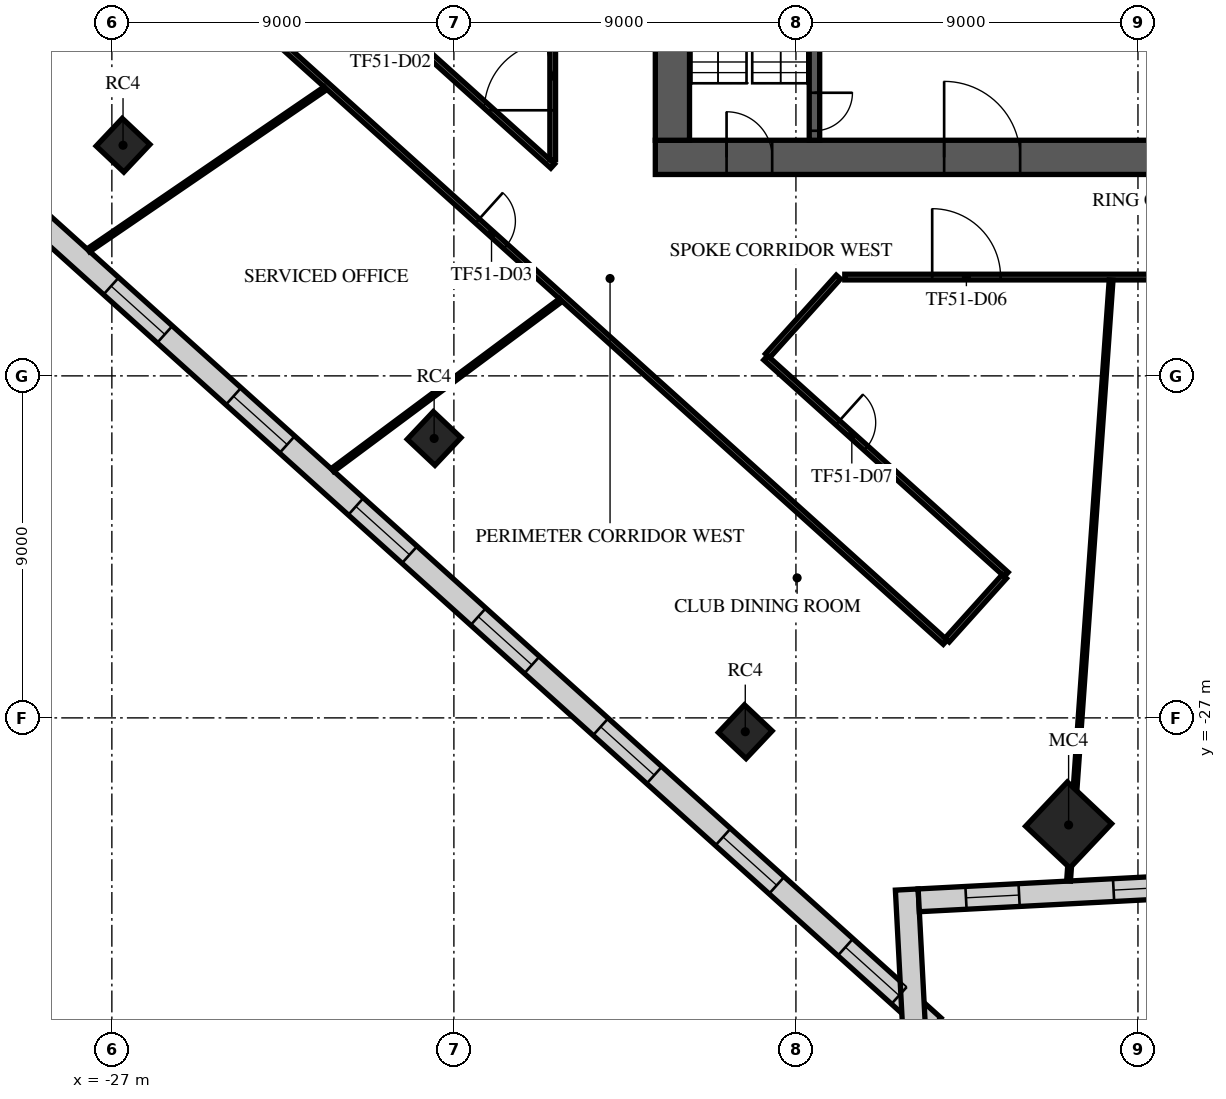
"""IFC4 building model, lengths in metres.
Left out: names, types, materials, properties, quantities, classifications, styles, units other than length and angle.
Written with IfcOpenShell. Run it as: python <this file> out.ifc"""

import sys

from ifc_helpers import new_model, si_unit, direction, frame, frame_2d, origin, origin_2d, place, context, subcontext, project, spatial, rectangle, extrude, element, fill, save


model = new_model("IFC4")
c1 = context("Model", 3, precision=1e-05, world=origin(), true_north=direction((0.0, 1.0)))
c2 = subcontext(c1, "Body", "Model", "MODEL_VIEW")
j1 = project(units=[si_unit("LENGTHUNIT", "METRE"), si_unit("PLANEANGLEUNIT", "RADIAN")], contexts=[c1])
p1 = place(None, origin())
s1 = spatial("IfcSite", under=j1, at=p1, CompositionType="ELEMENT")
p2 = place(p1, origin())
s2 = spatial("IfcBuilding", under=s1, at=p2, CompositionType="ELEMENT")
p3 = place(p2, frame((0.0, 0.0, 217.3)))
s3 = spatial("IfcBuildingStorey", under=s2, at=p3, CompositionType="ELEMENT", Elevation=217.3)
for number, where, z_axis, x_axis in (
    (1, (-26.706, -11.931, 0.0), (0.0, 0.0, 1.0), (0.686, 0.728, 0.0)),
    (2, (-18.52, -19.647, 0.0), (0.0, 0.0, 1.0), (0.686, 0.728, 0.0)),
    (3, (-10.333, -27.364, 0.0), (0.0, 0.0, 1.0), (0.686, 0.728, 0.0)),
):
    element("IfcColumn", number, at=place(p3, frame(where, z_axis=z_axis, x_axis=x_axis)), inside=s3, PredefinedType="COLUMN", context=c2, shape_type="SweptSolid", body=[
        extrude(rectangle(XDim=1.0, YDim=1.0, at=origin_2d()), origin(), (0.0, 0.0, 1.0), 4.0),
    ])
p4 = place(p3, frame((-1.825, -29.818, 0.0), z_axis=(0.0, 0.0, 1.0), x_axis=(0.685916152371, 0.727680583715, 0.0)))
e4 = element("IfcColumn", 4, at=p4, inside=s3, PredefinedType="COLUMN", context=c2, shape_type="SweptSolid", body=[
    extrude(rectangle(XDim=1.6, YDim=1.6, at=origin_2d()), origin(), (0.0, 0.0, 1.0), 4.0),
])
p5 = place(p3, frame((-12.7, -12.25, 0.0), z_axis=(0.0, 0.0, 1.0), x_axis=(1.0, 0.0, 0.0)))
e5 = element("IfcWall", 5, at=p5, inside=s3, PredefinedType="SHEAR", context=c2, shape_type="SweptSolid", body=[
    extrude(rectangle(XDim=25.4, YDim=0.9, at=frame_2d((12.7, 0.0))), origin(), (0.0, 0.0, 1.0), 3.62),
])
p6 = place(p5, frame((7.6, 0.0, 0.0)))
e6 = element("IfcOpeningElement", 6, at=p6, cuts=e5, PredefinedType="OPENING", context=c2, shape_type="SweptSolid", body=[
    extrude(rectangle(XDim=2.0, YDim=2.1, at=frame_2d((1.0, 1.05))), frame((0.0, 0.46, 0.0), z_axis=(0.0, -1.0, 0.0), x_axis=(1.0, 0.0, 0.0)), (0.0, 0.0, 1.0), 0.92),
])
p7 = place(p5, frame((17.725, 0.0, 0.0)))
e7 = element("IfcOpeningElement", 7, at=p7, cuts=e5, PredefinedType="OPENING", context=c2, shape_type="SweptSolid", body=[
    extrude(rectangle(XDim=1.2, YDim=2.1, at=frame_2d((0.6, 1.05))), frame((0.0, 0.46, 0.0), z_axis=(0.0, -1.0, 0.0), x_axis=(1.0, 0.0, 0.0)), (0.0, 0.0, 1.0), 0.92),
])
p8 = place(p5, frame((1.875, 0.0, 0.0)))
e8 = element("IfcOpeningElement", 8, at=p8, cuts=e5, PredefinedType="OPENING", context=c2, shape_type="SweptSolid", body=[
    extrude(rectangle(XDim=1.2, YDim=2.1, at=frame_2d((0.6, 1.05))), frame((0.0, 0.46, 0.0), z_axis=(0.0, -1.0, 0.0), x_axis=(1.0, 0.0, 0.0)), (0.0, 0.0, 1.0), 0.92),
])
p9 = place(p5, frame((22.325, 0.0, 0.0)))
e9 = element("IfcOpeningElement", 9, at=p9, cuts=e5, PredefinedType="OPENING", context=c2, shape_type="SweptSolid", body=[
    extrude(rectangle(XDim=1.2, YDim=2.1, at=frame_2d((0.6, 1.05))), frame((0.0, 0.46, 0.0), z_axis=(0.0, -1.0, 0.0), x_axis=(1.0, 0.0, 0.0)), (0.0, 0.0, 1.0), 0.92),
])
p10 = place(p3, frame((-12.25, -11.8, 0.0), z_axis=(0.0, 0.0, 1.0), x_axis=(0.0, 1.0, 0.0)))
e10 = element("IfcWall", 10, at=p10, inside=s3, PredefinedType="SHEAR", context=c2, shape_type="SweptSolid", body=[
    extrude(rectangle(XDim=23.6, YDim=0.9, at=frame_2d((11.8, 0.0))), origin(), (0.0, 0.0, 1.0), 3.62),
])
p11 = place(p10, frame((10.6, 0.0, 0.0)))
e11 = element("IfcOpeningElement", 11, at=p11, cuts=e10, PredefinedType="OPENING", context=c2, shape_type="SweptSolid", body=[
    extrude(rectangle(XDim=2.4, YDim=2.4, at=frame_2d((1.2, 1.2))), frame((0.0, 0.46, 0.0), z_axis=(0.0, -1.0, 0.0), x_axis=(1.0, 0.0, 0.0)), (0.0, 0.0, 1.0), 0.92),
])
p12 = place(p3, frame((-8.512, -4.55, 0.0), z_axis=(0.0, 0.0, 1.0), x_axis=(0.0, -1.0, 0.0)))
e12 = element("IfcWall", 12, at=p12, inside=s3, PredefinedType="SOLIDWALL", context=c2, shape_type="SweptSolid", body=[
    extrude(rectangle(XDim=7.25, YDim=0.275, at=frame_2d((3.625, 0.0))), origin(), (0.0, 0.0, 1.0), 3.62),
])
p13 = place(p12, frame((6.0, 0.0, 0.0)))
e13 = element("IfcOpeningElement", 13, at=p13, cuts=e12, PredefinedType="OPENING", context=c2, shape_type="SweptSolid", body=[
    extrude(rectangle(XDim=1.0, YDim=2.1, at=frame_2d((0.5, 1.05))), frame((0.0, 0.147, 0.0), z_axis=(0.0, -1.0, 0.0), x_axis=(1.0, 0.0, 0.0)), (0.0, 0.0, 1.0), 0.295),
])
p14 = place(p3, frame((-34.365, -9.023, 0.0), z_axis=(0.0, 0.0, 1.0), x_axis=(0.743146896498, -0.66912830625, 0.0)))
e14 = element("IfcWall", 14, at=p14, inside=s3, PredefinedType="STANDARD", context=c2, shape_type="SweptSolid", body=[
    extrude(rectangle(XDim=39.0, YDim=0.6, at=frame_2d((19.5, 0.0))), origin(), (0.0, 0.0, 1.0), 3.62),
])
p15 = place(p14, frame((1.217, 0.0, 0.9)))
e15 = element("IfcOpeningElement", 15, at=p15, cuts=e14, PredefinedType="OPENING", context=c2, shape_type="SweptSolid", body=[
    extrude(rectangle(XDim=1.9, YDim=2.1, at=frame_2d((0.95, 1.05))), frame((0.0, 0.31, 0.0), z_axis=(0.0, -1.0, 0.0), x_axis=(1.0, 0.0, 0.0)), (0.0, 0.0, 1.0), 0.62),
])
p16 = place(p14, frame((5.55, 0.0, 0.9)))
e16 = element("IfcOpeningElement", 16, at=p16, cuts=e14, PredefinedType="OPENING", context=c2, shape_type="SweptSolid", body=[
    extrude(rectangle(XDim=1.9, YDim=2.1, at=frame_2d((0.95, 1.05))), frame((0.0, 0.31, 0.0), z_axis=(0.0, -1.0, 0.0), x_axis=(1.0, 0.0, 0.0)), (0.0, 0.0, 1.0), 0.62),
])
p17 = place(p14, frame((9.883, 0.0, 0.9)))
e17 = element("IfcOpeningElement", 17, at=p17, cuts=e14, PredefinedType="OPENING", context=c2, shape_type="SweptSolid", body=[
    extrude(rectangle(XDim=1.9, YDim=2.1, at=frame_2d((0.95, 1.05))), frame((0.0, 0.31, 0.0), z_axis=(0.0, -1.0, 0.0), x_axis=(1.0, 0.0, 0.0)), (0.0, 0.0, 1.0), 0.62),
])
p18 = place(p14, frame((14.217, 0.0, 0.9)))
e18 = element("IfcOpeningElement", 18, at=p18, cuts=e14, PredefinedType="OPENING", context=c2, shape_type="SweptSolid", body=[
    extrude(rectangle(XDim=1.9, YDim=2.1, at=frame_2d((0.95, 1.05))), frame((0.0, 0.31, 0.0), z_axis=(0.0, -1.0, 0.0), x_axis=(1.0, 0.0, 0.0)), (0.0, 0.0, 1.0), 0.62),
])
p19 = place(p14, frame((18.55, 0.0, 0.9)))
e19 = element("IfcOpeningElement", 19, at=p19, cuts=e14, PredefinedType="OPENING", context=c2, shape_type="SweptSolid", body=[
    extrude(rectangle(XDim=1.9, YDim=2.1, at=frame_2d((0.95, 1.05))), frame((0.0, 0.31, 0.0), z_axis=(0.0, -1.0, 0.0), x_axis=(1.0, 0.0, 0.0)), (0.0, 0.0, 1.0), 0.62),
])
p20 = place(p14, frame((22.883, 0.0, 0.9)))
e20 = element("IfcOpeningElement", 20, at=p20, cuts=e14, PredefinedType="OPENING", context=c2, shape_type="SweptSolid", body=[
    extrude(rectangle(XDim=1.9, YDim=2.1, at=frame_2d((0.95, 1.05))), frame((0.0, 0.31, 0.0), z_axis=(0.0, -1.0, 0.0), x_axis=(1.0, 0.0, 0.0)), (0.0, 0.0, 1.0), 0.62),
])
p21 = place(p14, frame((27.217, 0.0, 0.9)))
e21 = element("IfcOpeningElement", 21, at=p21, cuts=e14, PredefinedType="OPENING", context=c2, shape_type="SweptSolid", body=[
    extrude(rectangle(XDim=1.9, YDim=2.1, at=frame_2d((0.95, 1.05))), frame((0.0, 0.31, 0.0), z_axis=(0.0, -1.0, 0.0), x_axis=(1.0, 0.0, 0.0)), (0.0, 0.0, 1.0), 0.62),
])
p22 = place(p14, frame((31.55, 0.0, 0.9)))
e22 = element("IfcOpeningElement", 22, at=p22, cuts=e14, PredefinedType="OPENING", context=c2, shape_type="SweptSolid", body=[
    extrude(rectangle(XDim=1.9, YDim=2.1, at=frame_2d((0.95, 1.05))), frame((0.0, 0.31, 0.0), z_axis=(0.0, -1.0, 0.0), x_axis=(1.0, 0.0, 0.0)), (0.0, 0.0, 1.0), 0.62),
])
p23 = place(p14, frame((35.883, 0.0, 0.9)))
e23 = element("IfcOpeningElement", 23, at=p23, cuts=e14, PredefinedType="OPENING", context=c2, shape_type="SweptSolid", body=[
    extrude(rectangle(XDim=1.9, YDim=2.1, at=frame_2d((0.95, 1.05))), frame((0.0, 0.31, 0.0), z_axis=(0.0, -1.0, 0.0), x_axis=(1.0, 0.0, 0.0)), (0.0, 0.0, 1.0), 0.62),
])
p24 = place(p3, frame((-5.882, -35.358, 0.0), z_axis=(0.0, 0.0, 1.0), x_axis=(-0.05236228724, 0.998628154457, 0.0)))
e24 = element("IfcWall", 24, at=p24, inside=s3, PredefinedType="STANDARD", context=c2, shape_type="SweptSolid", body=[
    extrude(rectangle(XDim=3.847, YDim=0.6, at=frame_2d((1.923, 0.0))), origin(), (0.0, 0.0, 1.0), 3.62),
])
p25 = place(p3, frame((-5.768, -31.801, 0.0), z_axis=(0.0, 0.0, 1.0), x_axis=(0.998630200543, 0.052323250701, 0.0)))
e25 = element("IfcWall", 25, at=p25, inside=s3, PredefinedType="STANDARD", context=c2, shape_type="SweptSolid", body=[
    extrude(rectangle(XDim=7.778, YDim=0.6, at=frame_2d((3.889, 0.0))), origin(), (0.0, 0.0, 1.0), 3.62),
])
p26 = place(p25, frame((1.244, 0.0, 0.9)))
e26 = element("IfcOpeningElement", 26, at=p26, cuts=e25, PredefinedType="OPENING", context=c2, shape_type="SweptSolid", body=[
    extrude(rectangle(XDim=1.4, YDim=2.1, at=frame_2d((0.7, 1.05))), frame((0.0, 0.31, 0.0), z_axis=(0.0, -1.0, 0.0), x_axis=(1.0, 0.0, 0.0)), (0.0, 0.0, 1.0), 0.62),
])
p27 = place(p25, frame((5.134, 0.0, 0.9)))
e27 = element("IfcOpeningElement", 27, at=p27, cuts=e25, PredefinedType="OPENING", context=c2, shape_type="SweptSolid", body=[
    extrude(rectangle(XDim=1.4, YDim=2.1, at=frame_2d((0.7, 1.05))), frame((0.0, 0.31, 0.0), z_axis=(0.0, -1.0, 0.0), x_axis=(1.0, 0.0, 0.0)), (0.0, 0.0, 1.0), 0.62),
])
p28 = place(p3, frame((-24.285, -7.708, 0.0), z_axis=(0.0, 0.0, 1.0), x_axis=(0.743144813636, -0.66913061951, 0.0)))
e28 = element("IfcWall", 28, at=p28, inside=s3, PredefinedType="PARTITIONING", context=c2, shape_type="SweptSolid", body=[
    extrude(rectangle(XDim=25.854, YDim=0.15, at=frame_2d((12.927, 0.0))), origin(), (0.0, 0.0, 1.0), 3.17),
])
p29 = place(p28, frame((9.29, 0.0, 0.0)))
e29 = element("IfcOpeningElement", 29, at=p29, cuts=e28, PredefinedType="OPENING", context=c2, shape_type="SweptSolid", body=[
    extrude(rectangle(XDim=1.0, YDim=2.1, at=frame_2d((0.5, 1.05))), frame((0.0, 0.085, 0.0), z_axis=(0.0, -1.0, 0.0), x_axis=(1.0, 0.0, 0.0)), (0.0, 0.0, 1.0), 0.17),
])
p30 = place(p3, frame((-22.679, -5.925, 0.0), z_axis=(0.0, 0.0, 1.0), x_axis=(0.743175153667, -0.669096921956, 0.0)))
e30 = element("IfcWall", 30, at=p30, inside=s3, PredefinedType="PARTITIONING", context=c2, shape_type="SweptSolid", body=[
    extrude(rectangle(XDim=9.795, YDim=0.15, at=frame_2d((4.897, 0.0))), origin(), (0.0, 0.0, 1.0), 3.17),
])
p31 = place(p30, frame((3.55, 0.0, 0.0)))
e31 = element("IfcOpeningElement", 31, at=p31, cuts=e30, PredefinedType="OPENING", context=c2, shape_type="SweptSolid", body=[
    extrude(rectangle(XDim=1.0, YDim=2.1, at=frame_2d((0.5, 1.05))), frame((0.0, 0.085, 0.0), z_axis=(0.0, -1.0, 0.0), x_axis=(1.0, 0.0, 0.0)), (0.0, 0.0, 1.0), 0.17),
])
p32 = place(p3, frame((-15.4, -12.311, 0.0), z_axis=(0.0, 0.0, 1.0), x_axis=(0.0, 1.0, 0.0)))
e32 = element("IfcWall", 32, at=p32, inside=s3, PredefinedType="PARTITIONING", context=c2, shape_type="SweptSolid", body=[
    extrude(rectangle(XDim=20.194, YDim=0.15, at=frame_2d((10.097, 0.0))), origin(), (0.0, 0.0, 1.0), 3.17),
])
p33 = place(p32, frame((1.3, 0.0, 0.0)))
e33 = element("IfcOpeningElement", 33, at=p33, cuts=e32, PredefinedType="OPENING", context=c2, shape_type="SweptSolid", body=[
    extrude(rectangle(XDim=1.8, YDim=2.1, at=frame_2d((0.9, 1.05))), frame((0.0, 0.085, 0.0), z_axis=(0.0, -1.0, 0.0), x_axis=(1.0, 0.0, 0.0)), (0.0, 0.0, 1.0), 0.17),
])
p34 = place(p3, frame((-9.796, -17.525, 0.0), z_axis=(0.0, 0.0, 1.0), x_axis=(0.743155880954, -0.669118327804, 0.0)))
e34 = element("IfcWall", 34, at=p34, inside=s3, PredefinedType="PARTITIONING", context=c2, shape_type="SweptSolid", body=[
    extrude(rectangle(XDim=8.518, YDim=0.15, at=frame_2d((4.259, 0.0))), origin(), (0.0, 0.0, 1.0), 3.17),
])
p35 = place(p34, frame((2.55, 0.0, 0.0)))
e35 = element("IfcOpeningElement", 35, at=p35, cuts=e34, PredefinedType="OPENING", context=c2, shape_type="SweptSolid", body=[
    extrude(rectangle(XDim=1.0, YDim=2.1, at=frame_2d((0.5, 1.05))), frame((0.0, 0.085, 0.0), z_axis=(0.0, -1.0, 0.0), x_axis=(1.0, 0.0, 0.0)), (0.0, 0.0, 1.0), 0.17),
])
p36 = place(p3, frame((-9.746, -17.469, 0.0), z_axis=(0.0, 0.0, 1.0), x_axis=(0.669042240246, 0.74322438117, 0.0)))
e36 = element("IfcWall", 36, at=p36, inside=s3, PredefinedType="PARTITIONING", context=c2, shape_type="SweptSolid", body=[
    extrude(rectangle(XDim=2.784, YDim=0.15, at=frame_2d((1.392, 0.0))), origin(), (0.0, 0.0, 1.0), 3.17),
])
p37 = place(p3, frame((-7.715, -15.4, 0.0), z_axis=(0.0, 0.0, 1.0), x_axis=(1.0, 0.0, 0.0)))
e37 = element("IfcWall", 37, at=p37, inside=s3, PredefinedType="PARTITIONING", context=c2, shape_type="SweptSolid", body=[
    extrude(rectangle(XDim=16.493, YDim=0.15, at=frame_2d((8.246, 0.0))), origin(), (0.0, 0.0, 1.0), 3.17),
])
p38 = place(p37, frame((2.3, 0.0, 0.0)))
e38 = element("IfcOpeningElement", 38, at=p38, cuts=e37, PredefinedType="OPENING", context=c2, shape_type="SweptSolid", body=[
    extrude(rectangle(XDim=1.8, YDim=2.1, at=frame_2d((0.9, 1.05))), frame((0.0, 0.085, 0.0), z_axis=(0.0, -1.0, 0.0), x_axis=(1.0, 0.0, 0.0)), (0.0, 0.0, 1.0), 0.17),
])
p39 = place(p37, frame((9.311, 0.0, 0.0)))
e39 = element("IfcOpeningElement", 39, at=p39, cuts=e37, PredefinedType="OPENING", context=c2, shape_type="SweptSolid", body=[
    extrude(rectangle(XDim=1.0, YDim=2.1, at=frame_2d((0.5, 1.05))), frame((0.0, 0.085, 0.0), z_axis=(0.0, -1.0, 0.0), x_axis=(1.0, 0.0, 0.0)), (0.0, 0.0, 1.0), 0.17),
])
p40 = place(p3, frame((-5.022, -24.952, 0.0), z_axis=(0.0, 0.0, 1.0), x_axis=(0.669030659462, 0.743234805899, 0.0)))
e40 = element("IfcWall", 40, at=p40, inside=s3, PredefinedType="PARTITIONING", context=c2, shape_type="SweptSolid", body=[
    extrude(rectangle(XDim=2.25, YDim=0.15, at=frame_2d((1.125, 0.0))), origin(), (0.0, 0.0, 1.0), 3.62),
])
p41 = place(p3, frame((-27.615, -14.694, 0.0), z_axis=(0.0, 0.0, 1.0), x_axis=(0.825481825388, 0.564428698733, 0.0)))
e41 = element("IfcWall", 41, at=p41, inside=s3, PredefinedType="PARTITIONING", context=c2, shape_type="SweptSolid", body=[
    extrude(rectangle(XDim=7.545, YDim=0.1, at=frame_2d((3.773, 0.0))), origin(), (0.0, 0.0, 1.0), 2.97),
])
p42 = place(p3, frame((-21.193, -20.476, 0.0), z_axis=(0.0, 0.0, 1.0), x_axis=(0.802187781021, 0.597071824808, 0.0)))
e42 = element("IfcWall", 42, at=p42, inside=s3, PredefinedType="PARTITIONING", context=c2, shape_type="SweptSolid", body=[
    extrude(rectangle(XDim=7.481, YDim=0.1, at=frame_2d((3.74, 0.0))), origin(), (0.0, 0.0, 1.0), 2.97),
])
p43 = place(p3, frame((-1.826, -31.292, 0.0), z_axis=(0.0, 0.0, 1.0), x_axis=(0.070558791605, 0.997507622491, 0.0)))
e43 = element("IfcWall", 43, at=p43, inside=s3, PredefinedType="PARTITIONING", context=c2, shape_type="SweptSolid", body=[
    extrude(rectangle(XDim=0.353, YDim=0.1, at=frame_2d((0.177, 0.0))), origin(), (0.0, 0.0, 1.0), 3.62),
])
p44 = place(p3, frame((-1.655, -28.879, 0.0), z_axis=(0.0, 0.0, 1.0), x_axis=(0.070623224113, 0.99750306276, 0.0)))
e44 = element("IfcWall", 44, at=p44, inside=s3, PredefinedType="PARTITIONING", context=c2, shape_type="SweptSolid", body=[
    extrude(rectangle(XDim=13.434, YDim=0.1, at=frame_2d((6.717, 0.0))), origin(), (0.0, 0.0, 1.0), 3.05),
])
p45 = place(p6, origin())
e45 = element("IfcDoor", 45, at=p45, inside=s3, OperationType="SINGLE_SWING_LEFT", PredefinedType="DOOR", context=c2, shape_type="SweptSolid", body=[
    extrude(rectangle(XDim=2.0, YDim=2.1, at=frame_2d((1.0, 1.05))), frame((0.0, 0.025, 0.0), z_axis=(0.0, -1.0, 0.0), x_axis=(1.0, 0.0, 0.0)), (0.0, 0.0, 1.0), 0.05),
])
fill(e6, e45)
p46 = place(p8, origin())
e46 = element("IfcDoor", 46, at=p46, inside=s3, OperationType="SINGLE_SWING_LEFT", PredefinedType="DOOR", context=c2, shape_type="SweptSolid", body=[
    extrude(rectangle(XDim=1.2, YDim=2.1, at=frame_2d((0.6, 1.05))), frame((0.0, 0.025, 0.0), z_axis=(0.0, -1.0, 0.0), x_axis=(1.0, 0.0, 0.0)), (0.0, 0.0, 1.0), 0.05),
])
fill(e8, e46)
p47 = place(p13, origin())
e47 = element("IfcDoor", 47, at=p47, inside=s3, OperationType="SINGLE_SWING_LEFT", PredefinedType="DOOR", context=c2, shape_type="SweptSolid", body=[
    extrude(rectangle(XDim=1.0, YDim=2.1, at=frame_2d((0.5, 1.05))), frame((0.0, 0.025, 0.0), z_axis=(0.0, -1.0, 0.0), x_axis=(1.0, 0.0, 0.0)), (0.0, 0.0, 1.0), 0.05),
])
fill(e13, e47)
p48 = place(p17, origin())
e48 = element("IfcWindow", 48, at=p48, inside=s3, PartitioningType="SINGLE_PANEL", PredefinedType="WINDOW", context=c2, shape_type="SweptSolid", body=[
    extrude(rectangle(XDim=1.9, YDim=2.1, at=frame_2d((0.95, 1.05))), frame((0.0, 0.03, 0.0), z_axis=(0.0, -1.0, 0.0), x_axis=(1.0, 0.0, 0.0)), (0.0, 0.0, 1.0), 0.06),
])
fill(e17, e48)
p49 = place(p18, origin())
e49 = element("IfcWindow", 49, at=p49, inside=s3, PartitioningType="SINGLE_PANEL", PredefinedType="WINDOW", context=c2, shape_type="SweptSolid", body=[
    extrude(rectangle(XDim=1.9, YDim=2.1, at=frame_2d((0.95, 1.05))), frame((0.0, 0.03, 0.0), z_axis=(0.0, -1.0, 0.0), x_axis=(1.0, 0.0, 0.0)), (0.0, 0.0, 1.0), 0.06),
])
fill(e18, e49)
p50 = place(p19, origin())
e50 = element("IfcWindow", 50, at=p50, inside=s3, PartitioningType="SINGLE_PANEL", PredefinedType="WINDOW", context=c2, shape_type="SweptSolid", body=[
    extrude(rectangle(XDim=1.9, YDim=2.1, at=frame_2d((0.95, 1.05))), frame((0.0, 0.03, 0.0), z_axis=(0.0, -1.0, 0.0), x_axis=(1.0, 0.0, 0.0)), (0.0, 0.0, 1.0), 0.06),
])
fill(e19, e50)
p51 = place(p20, origin())
e51 = element("IfcWindow", 51, at=p51, inside=s3, PartitioningType="SINGLE_PANEL", PredefinedType="WINDOW", context=c2, shape_type="SweptSolid", body=[
    extrude(rectangle(XDim=1.9, YDim=2.1, at=frame_2d((0.95, 1.05))), frame((0.0, 0.03, 0.0), z_axis=(0.0, -1.0, 0.0), x_axis=(1.0, 0.0, 0.0)), (0.0, 0.0, 1.0), 0.06),
])
fill(e20, e51)
p52 = place(p21, origin())
e52 = element("IfcWindow", 52, at=p52, inside=s3, PartitioningType="SINGLE_PANEL", PredefinedType="WINDOW", context=c2, shape_type="SweptSolid", body=[
    extrude(rectangle(XDim=1.9, YDim=2.1, at=frame_2d((0.95, 1.05))), frame((0.0, 0.03, 0.0), z_axis=(0.0, -1.0, 0.0), x_axis=(1.0, 0.0, 0.0)), (0.0, 0.0, 1.0), 0.06),
])
fill(e21, e52)
p53 = place(p22, origin())
e53 = element("IfcWindow", 53, at=p53, inside=s3, PartitioningType="SINGLE_PANEL", PredefinedType="WINDOW", context=c2, shape_type="SweptSolid", body=[
    extrude(rectangle(XDim=1.9, YDim=2.1, at=frame_2d((0.95, 1.05))), frame((0.0, 0.03, 0.0), z_axis=(0.0, -1.0, 0.0), x_axis=(1.0, 0.0, 0.0)), (0.0, 0.0, 1.0), 0.06),
])
fill(e22, e53)
p54 = place(p23, origin())
e54 = element("IfcWindow", 54, at=p54, inside=s3, PartitioningType="SINGLE_PANEL", PredefinedType="WINDOW", context=c2, shape_type="SweptSolid", body=[
    extrude(rectangle(XDim=1.9, YDim=2.1, at=frame_2d((0.95, 1.05))), frame((0.0, 0.03, 0.0), z_axis=(0.0, -1.0, 0.0), x_axis=(1.0, 0.0, 0.0)), (0.0, 0.0, 1.0), 0.06),
])
fill(e23, e54)
p55 = place(p26, origin())
e55 = element("IfcWindow", 55, at=p55, inside=s3, PartitioningType="SINGLE_PANEL", PredefinedType="WINDOW", context=c2, shape_type="SweptSolid", body=[
    extrude(rectangle(XDim=1.4, YDim=2.1, at=frame_2d((0.7, 1.05))), frame((0.0, 0.03, 0.0), z_axis=(0.0, -1.0, 0.0), x_axis=(1.0, 0.0, 0.0)), (0.0, 0.0, 1.0), 0.06),
])
fill(e26, e55)
p56 = place(p27, origin())
e56 = element("IfcWindow", 56, at=p56, inside=s3, PartitioningType="SINGLE_PANEL", PredefinedType="WINDOW", context=c2, shape_type="SweptSolid", body=[
    extrude(rectangle(XDim=1.4, YDim=2.1, at=frame_2d((0.7, 1.05))), frame((0.0, 0.03, 0.0), z_axis=(0.0, -1.0, 0.0), x_axis=(1.0, 0.0, 0.0)), (0.0, 0.0, 1.0), 0.06),
])
fill(e27, e56)
p57 = place(p33, origin())
e57 = element("IfcDoor", 57, at=p57, inside=s3, OperationType="DOUBLE_DOOR_SINGLE_SWING", PredefinedType="DOOR", context=c2, shape_type="SweptSolid", body=[
    extrude(rectangle(XDim=1.8, YDim=2.1, at=frame_2d((0.9, 1.05))), frame((0.0, 0.025, 0.0), z_axis=(0.0, -1.0, 0.0), x_axis=(1.0, 0.0, 0.0)), (0.0, 0.0, 1.0), 0.05),
])
fill(e33, e57)
p58 = place(p29, frame((1.0, 0.0, 0.0), z_axis=(0.0, 0.0, 1.0), x_axis=(-1.0, 0.0, 0.0)))
e58 = element("IfcDoor", 58, at=p58, inside=s3, OperationType="SINGLE_SWING_RIGHT", PredefinedType="DOOR", context=c2, shape_type="SweptSolid", body=[
    extrude(rectangle(XDim=1.0, YDim=2.1, at=frame_2d((0.5, 1.05))), frame((0.0, 0.025, 0.0), z_axis=(0.0, -1.0, 0.0), x_axis=(1.0, 0.0, 0.0)), (0.0, 0.0, 1.0), 0.05),
])
fill(e29, e58)
p59 = place(p38, frame((1.8, 0.0, 0.0), z_axis=(0.0, 0.0, 1.0), x_axis=(-1.0, 0.0, 0.0)))
e59 = element("IfcDoor", 59, at=p59, inside=s3, OperationType="DOUBLE_DOOR_SINGLE_SWING", PredefinedType="DOOR", context=c2, shape_type="SweptSolid", body=[
    extrude(rectangle(XDim=1.8, YDim=2.1, at=frame_2d((0.9, 1.05))), frame((0.0, 0.025, 0.0), z_axis=(0.0, -1.0, 0.0), x_axis=(1.0, 0.0, 0.0)), (0.0, 0.0, 1.0), 0.05),
])
fill(e38, e59)
p60 = place(p35, origin())
e60 = element("IfcDoor", 60, at=p60, inside=s3, OperationType="SINGLE_SWING_LEFT", PredefinedType="DOOR", context=c2, shape_type="SweptSolid", body=[
    extrude(rectangle(XDim=1.0, YDim=2.1, at=frame_2d((0.5, 1.05))), frame((0.0, 0.025, 0.0), z_axis=(0.0, -1.0, 0.0), x_axis=(1.0, 0.0, 0.0)), (0.0, 0.0, 1.0), 0.05),
])
fill(e35, e60)
save(model, sys.argv[1])
